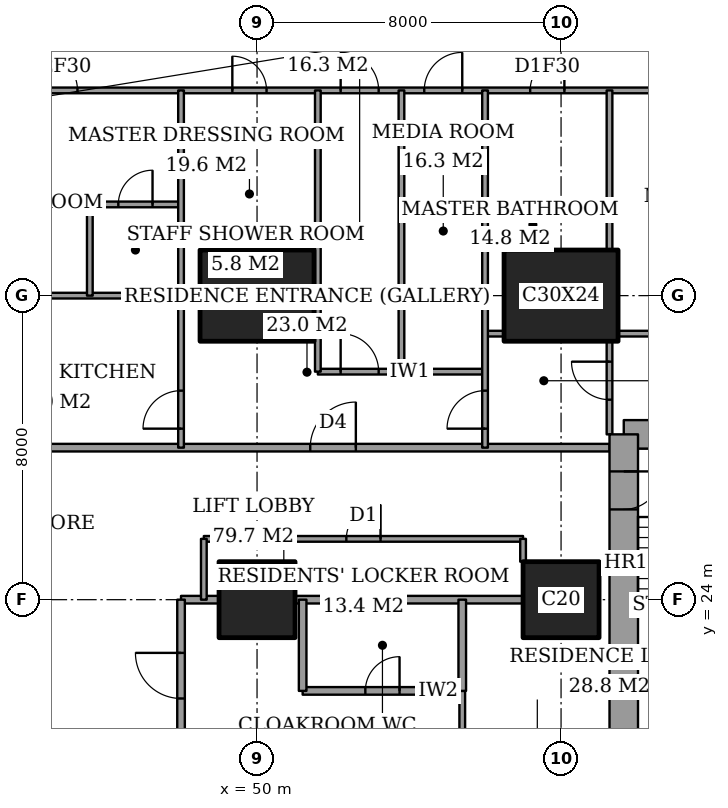
"""IFC4 building model, lengths in metres.
Left out: names, types, materials, properties, quantities, classifications, styles, units other than length and angle.
Written with IfcOpenShell. Run it as: python <this file> out.ifc"""

import sys

from ifc_helpers import new_model, si_unit, direction, frame, frame_2d, origin, origin_2d, place, context, subcontext, project, spatial, rectangle, extrude, element, fill, save


model = new_model("IFC4")
c1 = context("Model", 3, precision=1e-05, world=origin(), true_north=direction((0.0, 1.0)))
c2 = subcontext(c1, "Body", "Model", "MODEL_VIEW")
j1 = project(units=[si_unit("LENGTHUNIT", "METRE"), si_unit("PLANEANGLEUNIT", "RADIAN")], contexts=[c1])
p1 = place(None, origin())
s1 = spatial("IfcSite", under=j1, at=p1, CompositionType="ELEMENT")
p2 = place(p1, origin())
s2 = spatial("IfcBuilding", under=s1, at=p2, CompositionType="ELEMENT")
p3 = place(p2, frame((0.0, 0.0, 153.8)))
s3 = spatial("IfcBuildingStorey", under=s2, at=p3, CompositionType="ELEMENT", Elevation=153.8)
p4 = place(p3, frame((50.0, 24.0, 0.0), z_axis=(0.0, 0.0, 1.0), x_axis=(1.0, 0.0, 0.0)))
e1 = element("IfcColumn", 1, at=p4, inside=s3, PredefinedType="COLUMN", context=c2, shape_type="SweptSolid", body=[
    extrude(rectangle(XDim=2.0, YDim=2.0, at=origin_2d()), origin(), (0.0, 0.0, 1.0), 3.6),
])
p5 = place(p3, frame((50.0, 32.0, 0.0), z_axis=(0.0, 0.0, 1.0), x_axis=(1.0, 0.0, 0.0)))
e2 = element("IfcColumn", 2, at=p5, inside=s3, PredefinedType="COLUMN", context=c2, shape_type="SweptSolid", body=[
    extrude(rectangle(XDim=3.0, YDim=2.4, at=origin_2d()), origin(), (0.0, 0.0, 1.0), 3.6),
])
p6 = place(p3, frame((58.0, 24.0, 0.0), z_axis=(0.0, 0.0, 1.0), x_axis=(1.0, 0.0, 0.0)))
e3 = element("IfcColumn", 3, at=p6, inside=s3, PredefinedType="COLUMN", context=c2, shape_type="SweptSolid", body=[
    extrude(rectangle(XDim=2.0, YDim=2.0, at=origin_2d()), origin(), (0.0, 0.0, 1.0), 3.6),
])
p7 = place(p3, frame((58.0, 32.0, 0.0), z_axis=(0.0, 0.0, 1.0), x_axis=(1.0, 0.0, 0.0)))
e4 = element("IfcColumn", 4, at=p7, inside=s3, PredefinedType="COLUMN", context=c2, shape_type="SweptSolid", body=[
    extrude(rectangle(XDim=3.0, YDim=2.4, at=origin_2d()), origin(), (0.0, 0.0, 1.0), 3.6),
])
p8 = place(p3, frame((64.1, 28.35, 0.0), z_axis=(0.0, 0.0, 1.0), x_axis=(-1.0, 0.0, 0.0)))
e5 = element("IfcWall", 5, at=p8, inside=s3, PredefinedType="SHEAR", context=c2, shape_type="SweptSolid", body=[
    extrude(rectangle(XDim=4.45, YDim=0.75, at=frame_2d((2.225, 0.0))), origin(), (0.0, 0.0, 1.0), 3.6),
])
p9 = place(p3, frame((59.65, 28.35, 0.0), z_axis=(0.0, 0.0, 1.0), x_axis=(0.0, -1.0, 0.0)))
e6 = element("IfcWall", 6, at=p9, inside=s3, PredefinedType="SHEAR", context=c2, shape_type="SweptSolid", body=[
    extrude(rectangle(XDim=8.7, YDim=0.75, at=frame_2d((4.35, 0.0))), origin(), (0.0, 0.0, 1.0), 3.6),
])
p10 = place(p9, frame((0.975, 0.0, 0.0)))
e7 = element("IfcOpeningElement", 7, at=p10, cuts=e6, PredefinedType="OPENING", context=c2, shape_type="SweptSolid", body=[
    extrude(rectangle(XDim=1.0, YDim=2.1, at=frame_2d((0.5, 1.05))), frame((0.0, 0.385, 0.0), z_axis=(0.0, -1.0, 0.0), x_axis=(1.0, 0.0, 0.0)), (0.0, 0.0, 1.0), 0.77),
])
p11 = place(p3, frame((51.2, 21.6, 0.0), z_axis=(0.0, 0.0, 1.0), x_axis=(1.0, 0.0, 0.0)))
e8 = element("IfcWall", 8, at=p11, inside=s3, PredefinedType="PARTITIONING", context=c2, shape_type="SweptSolid", body=[
    extrude(rectangle(XDim=4.2, YDim=0.2, at=frame_2d((2.1, 0.0))), origin(), (0.0, 0.0, 1.0), 3.35),
])
p12 = place(p11, frame((1.65, 0.0, 0.0)))
e9 = element("IfcOpeningElement", 9, at=p12, cuts=e8, PredefinedType="OPENING", context=c2, shape_type="SweptSolid", body=[
    extrude(rectangle(XDim=0.9, YDim=2.1, at=frame_2d((0.45, 1.05))), frame((0.0, 0.11, 0.0), z_axis=(0.0, -1.0, 0.0), x_axis=(1.0, 0.0, 0.0)), (0.0, 0.0, 1.0), 0.22),
])
p13 = place(p3, frame((48.0, 24.0, 0.0), z_axis=(0.0, 0.0, 1.0), x_axis=(1.0, 0.0, 0.0)))
e10 = element("IfcWall", 10, at=p13, inside=s3, PredefinedType="PARTITIONING", context=c2, shape_type="SweptSolid", body=[
    extrude(rectangle(XDim=1.0, YDim=0.2, at=frame_2d((0.5, 0.0))), origin(), (0.0, 0.0, 1.0), 3.35),
])
p14 = place(p3, frame((51.0, 24.0, 0.0), z_axis=(0.0, 0.0, 1.0), x_axis=(1.0, 0.0, 0.0)))
e11 = element("IfcWall", 11, at=p14, inside=s3, PredefinedType="PARTITIONING", context=c2, shape_type="SweptSolid", body=[
    extrude(rectangle(XDim=6.0, YDim=0.2, at=frame_2d((3.0, 0.0))), origin(), (0.0, 0.0, 1.0), 3.35),
])
p15 = place(p3, frame((48.6, 25.6, 0.0), z_axis=(0.0, 0.0, 1.0), x_axis=(1.0, 0.0, 0.0)))
e12 = element("IfcWall", 12, at=p15, inside=s3, PredefinedType="PARTITIONING", context=c2, shape_type="SweptSolid", body=[
    extrude(rectangle(XDim=8.4, YDim=0.15, at=frame_2d((4.2, 0.0))), origin(), (0.0, 0.0, 1.0), 3.35),
])
p16 = place(p15, frame((3.75, 0.0, 0.0)))
e13 = element("IfcOpeningElement", 13, at=p16, cuts=e12, PredefinedType="OPENING", context=c2, shape_type="SweptSolid", body=[
    extrude(rectangle(XDim=0.9, YDim=2.1, at=frame_2d((0.45, 1.05))), frame((0.0, 0.085, 0.0), z_axis=(0.0, -1.0, 0.0), x_axis=(1.0, 0.0, 0.0)), (0.0, 0.0, 1.0), 0.17),
])
p17 = place(p3, frame((42.0, 28.0, 0.0), z_axis=(0.0, 0.0, 1.0), x_axis=(1.0, 0.0, 0.0)))
e14 = element("IfcWall", 14, at=p17, inside=s3, PredefinedType="PARTITIONING", context=c2, shape_type="SweptSolid", body=[
    extrude(rectangle(XDim=17.275, YDim=0.2, at=frame_2d((8.637, 0.0))), origin(), (0.0, 0.0, 1.0), 3.35),
])
p18 = place(p17, frame((9.4, 0.0, 0.0)))
e15 = element("IfcOpeningElement", 15, at=p18, cuts=e14, PredefinedType="OPENING", context=c2, shape_type="SweptSolid", body=[
    extrude(rectangle(XDim=1.2, YDim=2.4, at=frame_2d((0.6, 1.2))), frame((0.0, 0.11, 0.0), z_axis=(0.0, -1.0, 0.0), x_axis=(1.0, 0.0, 0.0)), (0.0, 0.0, 1.0), 0.22),
])
p19 = place(p3, frame((51.6, 30.0, 0.0), z_axis=(0.0, 0.0, 1.0), x_axis=(1.0, 0.0, 0.0)))
e16 = element("IfcWall", 16, at=p19, inside=s3, PredefinedType="PARTITIONING", context=c2, shape_type="SweptSolid", body=[
    extrude(rectangle(XDim=4.4, YDim=0.15, at=frame_2d((2.2, 0.0))), origin(), (0.0, 0.0, 1.0), 3.35),
])
p20 = place(p19, frame((0.6, 0.0, 0.0)))
e17 = element("IfcOpeningElement", 17, at=p20, cuts=e16, PredefinedType="OPENING", context=c2, shape_type="SweptSolid", body=[
    extrude(rectangle(XDim=1.0, YDim=2.1, at=frame_2d((0.5, 1.05))), frame((0.0, 0.085, 0.0), z_axis=(0.0, -1.0, 0.0), x_axis=(1.0, 0.0, 0.0)), (0.0, 0.0, 1.0), 0.17),
])
p21 = place(p3, frame((56.0, 31.0, 0.0), z_axis=(0.0, 0.0, 1.0), x_axis=(1.0, 0.0, 0.0)))
e18 = element("IfcWall", 18, at=p21, inside=s3, PredefinedType="PARTITIONING", context=c2, shape_type="SweptSolid", body=[
    extrude(rectangle(XDim=0.5, YDim=0.15, at=frame_2d((0.25, 0.0))), origin(), (0.0, 0.0, 1.0), 3.35),
])
p22 = place(p3, frame((59.5, 31.0, 0.0), z_axis=(0.0, 0.0, 1.0), x_axis=(1.0, 0.0, 0.0)))
e19 = element("IfcWall", 19, at=p22, inside=s3, PredefinedType="PARTITIONING", context=c2, shape_type="SweptSolid", body=[
    extrude(rectangle(XDim=5.15, YDim=0.15, at=frame_2d((2.575, 0.0))), origin(), (0.0, 0.0, 1.0), 3.35),
])
p23 = place(p3, frame((48.0, 31.95, 0.0), z_axis=(0.0, 0.0, 1.0), x_axis=(1.0, 0.0, 0.0)))
e20 = element("IfcWall", 20, at=p23, inside=s3, PredefinedType="PARTITIONING", context=c2, shape_type="SweptSolid", body=[
    extrude(rectangle(XDim=0.5, YDim=0.15, at=frame_2d((0.25, 0.0))), origin(), (0.0, 0.0, 1.0), 2.634),
])
p24 = place(p3, frame((42.0, 32.0, 0.0), z_axis=(0.0, 0.0, 1.0), x_axis=(1.0, 0.0, 0.0)))
e21 = element("IfcWall", 21, at=p24, inside=s3, PredefinedType="PARTITIONING", context=c2, shape_type="SweptSolid", body=[
    extrude(rectangle(XDim=6.0, YDim=0.15, at=frame_2d((3.0, 0.0))), origin(), (0.0, 0.0, 1.0), 2.634),
])
p25 = place(p3, frame((45.6, 34.4, 0.0), z_axis=(0.0, 0.0, 1.0), x_axis=(1.0, 0.0, 0.0)))
e22 = element("IfcWall", 22, at=p25, inside=s3, PredefinedType="PARTITIONING", context=c2, shape_type="SweptSolid", body=[
    extrude(rectangle(XDim=2.4, YDim=0.15, at=frame_2d((1.2, 0.0))), origin(), (0.0, 0.0, 1.0), 3.35),
])
p26 = place(p25, frame((0.75, 0.0, 0.0)))
e23 = element("IfcOpeningElement", 23, at=p26, cuts=e22, PredefinedType="OPENING", context=c2, shape_type="SweptSolid", body=[
    extrude(rectangle(XDim=0.9, YDim=2.1, at=frame_2d((0.45, 1.05))), frame((0.0, 0.085, 0.0), z_axis=(0.0, -1.0, 0.0), x_axis=(1.0, 0.0, 0.0)), (0.0, 0.0, 1.0), 0.17),
])
p27 = place(p3, frame((41.439, 37.4, 0.0), z_axis=(0.0, 0.0, 1.0), x_axis=(1.0, 0.0, 0.0)))
e24 = element("IfcWall", 24, at=p27, inside=s3, PredefinedType="PARTITIONING", context=c2, shape_type="SweptSolid", body=[
    extrude(rectangle(XDim=25.011, YDim=0.15, at=frame_2d((12.505, 0.0))), origin(), (0.0, 0.0, 1.0), 3.35),
])
p28 = place(p27, frame((10.761, 0.0, 0.0)))
e25 = element("IfcOpeningElement", 25, at=p28, cuts=e24, PredefinedType="OPENING", context=c2, shape_type="SweptSolid", body=[
    extrude(rectangle(XDim=1.0, YDim=2.1, at=frame_2d((0.5, 1.05))), frame((0.0, 0.085, 0.0), z_axis=(0.0, -1.0, 0.0), x_axis=(1.0, 0.0, 0.0)), (0.0, 0.0, 1.0), 0.17),
])
p29 = place(p27, frame((20.924, 0.0, 0.0)))
e26 = element("IfcOpeningElement", 26, at=p29, cuts=e24, PredefinedType="OPENING", context=c2, shape_type="SweptSolid", body=[
    extrude(rectangle(XDim=1.0, YDim=2.1, at=frame_2d((0.5, 1.05))), frame((0.0, 0.085, 0.0), z_axis=(0.0, -1.0, 0.0), x_axis=(1.0, 0.0, 0.0)), (0.0, 0.0, 1.0), 0.17),
])
p30 = place(p27, frame((15.749, 0.0, 0.0)))
e27 = element("IfcOpeningElement", 27, at=p30, cuts=e24, PredefinedType="OPENING", context=c2, shape_type="SweptSolid", body=[
    extrude(rectangle(XDim=0.9, YDim=2.1, at=frame_2d((0.45, 1.05))), frame((0.0, 0.085, 0.0), z_axis=(0.0, -1.0, 0.0), x_axis=(1.0, 0.0, 0.0)), (0.0, 0.0, 1.0), 0.17),
])
p31 = place(p27, frame((12.961, 0.0, 0.0)))
e28 = element("IfcOpeningElement", 28, at=p31, cuts=e24, PredefinedType="OPENING", context=c2, shape_type="SweptSolid", body=[
    extrude(rectangle(XDim=1.0, YDim=2.1, at=frame_2d((0.5, 1.05))), frame((0.0, 0.085, 0.0), z_axis=(0.0, -1.0, 0.0), x_axis=(1.0, 0.0, 0.0)), (0.0, 0.0, 1.0), 0.17),
])
p32 = place(p27, frame((7.911, 0.0, 0.0)))
e29 = element("IfcOpeningElement", 29, at=p32, cuts=e24, PredefinedType="OPENING", context=c2, shape_type="SweptSolid", body=[
    extrude(rectangle(XDim=0.9, YDim=2.1, at=frame_2d((0.45, 1.05))), frame((0.0, 0.085, 0.0), z_axis=(0.0, -1.0, 0.0), x_axis=(1.0, 0.0, 0.0)), (0.0, 0.0, 1.0), 0.17),
])
p33 = place(p27, frame((2.836, 0.0, 0.0)))
e30 = element("IfcOpeningElement", 30, at=p33, cuts=e24, PredefinedType="OPENING", context=c2, shape_type="SweptSolid", body=[
    extrude(rectangle(XDim=1.0, YDim=2.1, at=frame_2d((0.5, 1.05))), frame((0.0, 0.085, 0.0), z_axis=(0.0, -1.0, 0.0), x_axis=(1.0, 0.0, 0.0)), (0.0, 0.0, 1.0), 0.17),
])
p34 = place(p3, frame((45.6, 32.0, 0.0), z_axis=(0.0, 0.0, 1.0), x_axis=(0.0, 1.0, 0.0)))
e31 = element("IfcWall", 31, at=p34, inside=s3, PredefinedType="PARTITIONING", context=c2, shape_type="SweptSolid", body=[
    extrude(rectangle(XDim=2.4, YDim=0.15, at=frame_2d((1.2, 0.0))), origin(), (0.0, 0.0, 1.0), 3.35),
])
p35 = place(p3, frame((48.0, 17.5, 0.0), z_axis=(0.0, 0.0, 1.0), x_axis=(0.0, 1.0, 0.0)))
e32 = element("IfcWall", 32, at=p35, inside=s3, PredefinedType="PARTITIONING", context=c2, shape_type="SweptSolid", body=[
    extrude(rectangle(XDim=6.5, YDim=0.2, at=frame_2d((3.25, 0.0))), origin(), (0.0, 0.0, 1.0), 3.35),
])
p36 = place(p35, frame((3.9, 0.0, 0.0)))
e33 = element("IfcOpeningElement", 33, at=p36, cuts=e32, PredefinedType="OPENING", context=c2, shape_type="SweptSolid", body=[
    extrude(rectangle(XDim=1.2, YDim=2.4, at=frame_2d((0.6, 1.2))), frame((0.0, 0.11, 0.0), z_axis=(0.0, -1.0, 0.0), x_axis=(1.0, 0.0, 0.0)), (0.0, 0.0, 1.0), 0.22),
])
p37 = place(p35, frame((0.8, 0.0, 0.0)))
e34 = element("IfcOpeningElement", 34, at=p37, cuts=e32, PredefinedType="OPENING", context=c2, shape_type="SweptSolid", body=[
    extrude(rectangle(XDim=0.9, YDim=2.1, at=frame_2d((0.45, 1.05))), frame((0.0, 0.11, 0.0), z_axis=(0.0, -1.0, 0.0), x_axis=(1.0, 0.0, 0.0)), (0.0, 0.0, 1.0), 0.22),
])
p38 = place(p3, frame((48.0, 28.0, 0.0), z_axis=(0.0, 0.0, 1.0), x_axis=(0.0, 1.0, 0.0)))
e35 = element("IfcWall", 35, at=p38, inside=s3, PredefinedType="PARTITIONING", context=c2, shape_type="SweptSolid", body=[
    extrude(rectangle(XDim=9.4, YDim=0.15, at=frame_2d((4.7, 0.0))), origin(), (0.0, 0.0, 1.0), 3.35),
])
p39 = place(p38, frame((0.5, 0.0, 0.0)))
e36 = element("IfcOpeningElement", 36, at=p39, cuts=e35, PredefinedType="OPENING", context=c2, shape_type="SweptSolid", body=[
    extrude(rectangle(XDim=1.0, YDim=2.1, at=frame_2d((0.5, 1.05))), frame((0.0, 0.085, 0.0), z_axis=(0.0, -1.0, 0.0), x_axis=(1.0, 0.0, 0.0)), (0.0, 0.0, 1.0), 0.17),
])
p40 = place(p3, frame((48.6, 24.0, 0.0), z_axis=(0.0, 0.0, 1.0), x_axis=(0.0, 1.0, 0.0)))
e37 = element("IfcWall", 37, at=p40, inside=s3, PredefinedType="PARTITIONING", context=c2, shape_type="SweptSolid", body=[
    extrude(rectangle(XDim=1.6, YDim=0.15, at=frame_2d((0.8, 0.0))), origin(), (0.0, 0.0, 1.0), 3.35),
])
p41 = place(p3, frame((51.2, 21.6, 0.0), z_axis=(0.0, 0.0, 1.0), x_axis=(0.0, 1.0, 0.0)))
e38 = element("IfcWall", 38, at=p41, inside=s3, PredefinedType="PARTITIONING", context=c2, shape_type="SweptSolid", body=[
    extrude(rectangle(XDim=2.4, YDim=0.2, at=frame_2d((1.2, 0.0))), origin(), (0.0, 0.0, 1.0), 3.35),
])
for number, where, z_axis, x_axis in (
    (39, (51.6, 30.0, 0.0), (0.0, 0.0, 1.0), (0.0, 1.0, 0.0)),
    (40, (53.8, 30.0, 0.0), (0.0, 0.0, 1.0), (0.0, 1.0, 0.0)),
):
    element("IfcWall", number, at=place(p3, frame(where, z_axis=z_axis, x_axis=x_axis)), inside=s3, PredefinedType="PARTITIONING", context=c2, shape_type="SweptSolid", body=[
        extrude(rectangle(XDim=7.4, YDim=0.15, at=frame_2d((3.7, 0.0))), origin(), (0.0, 0.0, 1.0), 3.35),
    ])
p42 = place(p3, frame((55.4, 21.6, 0.0), z_axis=(0.0, 0.0, 1.0), x_axis=(0.0, 1.0, 0.0)))
e41 = element("IfcWall", 41, at=p42, inside=s3, PredefinedType="PARTITIONING", context=c2, shape_type="SweptSolid", body=[
    extrude(rectangle(XDim=2.4, YDim=0.2, at=frame_2d((1.2, 0.0))), origin(), (0.0, 0.0, 1.0), 3.35),
])
p43 = place(p3, frame((55.4, 11.0, 0.0), z_axis=(0.0, 0.0, 1.0), x_axis=(0.0, 1.0, 0.0)))
e42 = element("IfcWall", 42, at=p43, inside=s3, PredefinedType="PARTITIONING", context=c2, shape_type="SweptSolid", body=[
    extrude(rectangle(XDim=10.6, YDim=0.15, at=frame_2d((5.3, 0.0))), origin(), (0.0, 0.0, 1.0), 3.35),
])
p44 = place(p43, frame((8.05, 0.0, 0.0)))
e43 = element("IfcOpeningElement", 43, at=p44, cuts=e42, PredefinedType="OPENING", context=c2, shape_type="SweptSolid", body=[
    extrude(rectangle(XDim=1.0, YDim=2.1, at=frame_2d((0.5, 1.05))), frame((0.0, 0.085, 0.0), z_axis=(0.0, -1.0, 0.0), x_axis=(1.0, 0.0, 0.0)), (0.0, 0.0, 1.0), 0.17),
])
p45 = place(p3, frame((56.0, 28.0, 0.0), z_axis=(0.0, 0.0, 1.0), x_axis=(0.0, 1.0, 0.0)))
e44 = element("IfcWall", 44, at=p45, inside=s3, PredefinedType="PARTITIONING", context=c2, shape_type="SweptSolid", body=[
    extrude(rectangle(XDim=9.4, YDim=0.15, at=frame_2d((4.7, 0.0))), origin(), (0.0, 0.0, 1.0), 3.35),
])
p46 = place(p45, frame((0.5, 0.0, 0.0)))
e45 = element("IfcOpeningElement", 45, at=p46, cuts=e44, PredefinedType="OPENING", context=c2, shape_type="SweptSolid", body=[
    extrude(rectangle(XDim=1.0, YDim=2.1, at=frame_2d((0.5, 1.05))), frame((0.0, 0.085, 0.0), z_axis=(0.0, -1.0, 0.0), x_axis=(1.0, 0.0, 0.0)), (0.0, 0.0, 1.0), 0.17),
])
p47 = place(p3, frame((57.0, 25.0, 0.0), z_axis=(0.0, 0.0, 1.0), x_axis=(0.0, 1.0, 0.0)))
e46 = element("IfcWall", 46, at=p47, inside=s3, PredefinedType="PARTITIONING", context=c2, shape_type="SweptSolid", body=[
    extrude(rectangle(XDim=0.6, YDim=0.15, at=frame_2d((0.3, 0.0))), origin(), (0.0, 0.0, 1.0), 3.35),
])
p48 = place(p3, frame((59.275, 28.35, 0.0), z_axis=(0.0, 0.0, 1.0), x_axis=(0.0, 1.0, 0.0)))
e47 = element("IfcWall", 47, at=p48, inside=s3, PredefinedType="PARTITIONING", context=c2, shape_type="SweptSolid", body=[
    extrude(rectangle(XDim=2.45, YDim=0.15, at=frame_2d((1.225, 0.0))), origin(), (0.0, 0.0, 1.0), 3.35),
])
p49 = place(p48, frame((0.913, 0.0, 0.0)))
e48 = element("IfcOpeningElement", 48, at=p49, cuts=e47, PredefinedType="OPENING", context=c2, shape_type="SweptSolid", body=[
    extrude(rectangle(XDim=1.0, YDim=2.1, at=frame_2d((0.5, 1.05))), frame((0.0, 0.085, 0.0), z_axis=(0.0, -1.0, 0.0), x_axis=(1.0, 0.0, 0.0)), (0.0, 0.0, 1.0), 0.17),
])
p50 = place(p3, frame((59.275, 33.2, 0.0), z_axis=(0.0, 0.0, 1.0), x_axis=(0.0, 1.0, 0.0)))
e49 = element("IfcWall", 49, at=p50, inside=s3, PredefinedType="PARTITIONING", context=c2, shape_type="SweptSolid", body=[
    extrude(rectangle(XDim=4.2, YDim=0.15, at=frame_2d((2.1, 0.0))), origin(), (0.0, 0.0, 1.0), 3.35),
])
p51 = place(p12, origin())
e50 = element("IfcDoor", 50, at=p51, inside=s3, OperationType="SINGLE_SWING_LEFT", PredefinedType="DOOR", context=c2, shape_type="SweptSolid", body=[
    extrude(rectangle(XDim=0.9, YDim=2.1, at=frame_2d((0.45, 1.05))), frame((0.0, 0.025, 0.0), z_axis=(0.0, -1.0, 0.0), x_axis=(1.0, 0.0, 0.0)), (0.0, 0.0, 1.0), 0.05),
])
fill(e9, e50)
p52 = place(p36, origin())
e51 = element("IfcDoor", 51, at=p52, inside=s3, OperationType="SINGLE_SWING_LEFT", PredefinedType="DOOR", context=c2, shape_type="SweptSolid", body=[
    extrude(rectangle(XDim=1.2, YDim=2.4, at=frame_2d((0.6, 1.2))), frame((0.0, 0.025, 0.0), z_axis=(0.0, -1.0, 0.0), x_axis=(1.0, 0.0, 0.0)), (0.0, 0.0, 1.0), 0.05),
])
fill(e33, e51)
p53 = place(p28, origin())
e52 = element("IfcDoor", 52, at=p53, inside=s3, OperationType="SINGLE_SWING_RIGHT", PredefinedType="DOOR", context=c2, shape_type="SweptSolid", body=[
    extrude(rectangle(XDim=1.0, YDim=2.1, at=frame_2d((0.5, 1.05))), frame((0.0, 0.025, 0.0), z_axis=(0.0, -1.0, 0.0), x_axis=(1.0, 0.0, 0.0)), (0.0, 0.0, 1.0), 0.05),
])
fill(e25, e52)
p54 = place(p49, origin())
e53 = element("IfcDoor", 53, at=p54, inside=s3, OperationType="SINGLE_SWING_LEFT", PredefinedType="DOOR", context=c2, shape_type="SweptSolid", body=[
    extrude(rectangle(XDim=1.0, YDim=2.1, at=frame_2d((0.5, 1.05))), frame((0.0, 0.025, 0.0), z_axis=(0.0, -1.0, 0.0), x_axis=(1.0, 0.0, 0.0)), (0.0, 0.0, 1.0), 0.05),
])
fill(e48, e53)
p55 = place(p30, origin())
e54 = element("IfcDoor", 54, at=p55, inside=s3, OperationType="SINGLE_SWING_LEFT", PredefinedType="DOOR", context=c2, shape_type="SweptSolid", body=[
    extrude(rectangle(XDim=0.9, YDim=2.1, at=frame_2d((0.45, 1.05))), frame((0.0, 0.025, 0.0), z_axis=(0.0, -1.0, 0.0), x_axis=(1.0, 0.0, 0.0)), (0.0, 0.0, 1.0), 0.05),
])
fill(e27, e54)
p56 = place(p46, origin())
e55 = element("IfcDoor", 55, at=p56, inside=s3, OperationType="SINGLE_SWING_RIGHT", PredefinedType="DOOR", context=c2, shape_type="SweptSolid", body=[
    extrude(rectangle(XDim=1.0, YDim=2.1, at=frame_2d((0.5, 1.05))), frame((0.0, 0.025, 0.0), z_axis=(0.0, -1.0, 0.0), x_axis=(1.0, 0.0, 0.0)), (0.0, 0.0, 1.0), 0.05),
])
fill(e45, e55)
p57 = place(p18, origin())
e56 = element("IfcDoor", 56, at=p57, inside=s3, OperationType="SINGLE_SWING_LEFT", PredefinedType="DOOR", context=c2, shape_type="SweptSolid", body=[
    extrude(rectangle(XDim=1.2, YDim=2.4, at=frame_2d((0.6, 1.2))), frame((0.0, 0.025, 0.0), z_axis=(0.0, -1.0, 0.0), x_axis=(1.0, 0.0, 0.0)), (0.0, 0.0, 1.0), 0.05),
])
fill(e15, e56)
p58 = place(p31, origin())
e57 = element("IfcDoor", 57, at=p58, inside=s3, OperationType="SINGLE_SWING_LEFT", PredefinedType="DOOR", context=c2, shape_type="SweptSolid", body=[
    extrude(rectangle(XDim=1.0, YDim=2.1, at=frame_2d((0.5, 1.05))), frame((0.0, 0.025, 0.0), z_axis=(0.0, -1.0, 0.0), x_axis=(1.0, 0.0, 0.0)), (0.0, 0.0, 1.0), 0.05),
])
fill(e28, e57)
p59 = place(p20, origin())
e58 = element("IfcDoor", 58, at=p59, inside=s3, OperationType="SINGLE_SWING_RIGHT", PredefinedType="DOOR", context=c2, shape_type="SweptSolid", body=[
    extrude(rectangle(XDim=1.0, YDim=2.1, at=frame_2d((0.5, 1.05))), frame((0.0, 0.025, 0.0), z_axis=(0.0, -1.0, 0.0), x_axis=(1.0, 0.0, 0.0)), (0.0, 0.0, 1.0), 0.05),
])
fill(e17, e58)
p60 = place(p32, origin())
e59 = element("IfcDoor", 59, at=p60, inside=s3, OperationType="SINGLE_SWING_RIGHT", PredefinedType="DOOR", context=c2, shape_type="SweptSolid", body=[
    extrude(rectangle(XDim=0.9, YDim=2.1, at=frame_2d((0.45, 1.05))), frame((0.0, 0.025, 0.0), z_axis=(0.0, -1.0, 0.0), x_axis=(1.0, 0.0, 0.0)), (0.0, 0.0, 1.0), 0.05),
])
fill(e29, e59)
p61 = place(p26, origin())
e60 = element("IfcDoor", 60, at=p61, inside=s3, OperationType="SINGLE_SWING_LEFT", PredefinedType="DOOR", context=c2, shape_type="SweptSolid", body=[
    extrude(rectangle(XDim=0.9, YDim=2.1, at=frame_2d((0.45, 1.05))), frame((0.0, 0.025, 0.0), z_axis=(0.0, -1.0, 0.0), x_axis=(1.0, 0.0, 0.0)), (0.0, 0.0, 1.0), 0.05),
])
fill(e23, e60)
p62 = place(p33, origin())
e61 = element("IfcDoor", 61, at=p62, inside=s3, OperationType="SINGLE_SWING_RIGHT", PredefinedType="DOOR", context=c2, shape_type="SweptSolid", body=[
    extrude(rectangle(XDim=1.0, YDim=2.1, at=frame_2d((0.5, 1.05))), frame((0.0, 0.025, 0.0), z_axis=(0.0, -1.0, 0.0), x_axis=(1.0, 0.0, 0.0)), (0.0, 0.0, 1.0), 0.05),
])
fill(e30, e61)
p63 = place(p39, origin())
e62 = element("IfcDoor", 62, at=p63, inside=s3, OperationType="SINGLE_SWING_RIGHT", PredefinedType="DOOR", context=c2, shape_type="SweptSolid", body=[
    extrude(rectangle(XDim=1.0, YDim=2.1, at=frame_2d((0.5, 1.05))), frame((0.0, 0.025, 0.0), z_axis=(0.0, -1.0, 0.0), x_axis=(1.0, 0.0, 0.0)), (0.0, 0.0, 1.0), 0.05),
])
fill(e36, e62)
p64 = place(p16, origin())
e63 = element("IfcDoor", 63, at=p64, inside=s3, OperationType="SINGLE_SWING_LEFT", PredefinedType="DOOR", context=c2, shape_type="SweptSolid", body=[
    extrude(rectangle(XDim=0.9, YDim=2.1, at=frame_2d((0.45, 1.05))), frame((0.0, 0.025, 0.0), z_axis=(0.0, -1.0, 0.0), x_axis=(1.0, 0.0, 0.0)), (0.0, 0.0, 1.0), 0.05),
])
fill(e13, e63)
p65 = place(p10, origin())
e64 = element("IfcDoor", 64, at=p65, inside=s3, OperationType="SINGLE_SWING_RIGHT", PredefinedType="DOOR", context=c2, shape_type="SweptSolid", body=[
    extrude(rectangle(XDim=1.0, YDim=2.1, at=frame_2d((0.5, 1.05))), frame((0.0, 0.025, 0.0), z_axis=(0.0, -1.0, 0.0), x_axis=(1.0, 0.0, 0.0)), (0.0, 0.0, 1.0), 0.05),
])
fill(e7, e64)
save(model, sys.argv[1])
